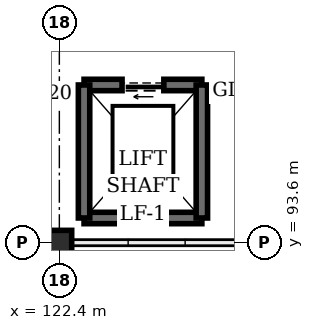
"""IFC4 building model, lengths in metres.
Left out: names, types, materials, properties, quantities, classifications, styles, units other than length and angle.
Written with IfcOpenShell. Run it as: python <this file> out.ifc"""

import sys

from ifc_helpers import new_model, si_unit, direction, frame, frame_2d, origin, origin_2d, place, context, subcontext, project, spatial, rectangle, extrude, element, fill, save


model = new_model("IFC4")
c1 = context("Model", 3, precision=1e-05, world=origin(), true_north=direction((0.0, 1.0)))
c2 = subcontext(c1, "Body", "Model", "MODEL_VIEW")
j1 = project(units=[si_unit("LENGTHUNIT", "METRE"), si_unit("PLANEANGLEUNIT", "RADIAN")], contexts=[c1])
p1 = place(None, origin())
s1 = spatial("IfcSite", under=j1, at=p1, CompositionType="ELEMENT")
p2 = place(p1, origin())
s2 = spatial("IfcBuilding", under=s1, at=p2, CompositionType="ELEMENT")
p3 = place(p2, frame((0.0, 0.0, 10.2)))
s3 = spatial("IfcBuildingStorey", under=s2, at=p3, CompositionType="ELEMENT", Elevation=10.2)
p4 = place(p3, frame((122.4, 93.6, 0.0), z_axis=(0.0, 0.0, 1.0), x_axis=(1.0, 0.0, 0.0)))
e1 = element("IfcColumn", 1, at=p4, inside=s3, PredefinedType="COLUMN", context=c2, shape_type="SweptSolid", body=[
    extrude(rectangle(XDim=0.65, YDim=0.65, at=origin_2d()), origin(), (0.0, 0.0, 1.0), 4.2),
])
p5 = place(p3, frame((123.05, 94.25, 0.0), z_axis=(0.0, 0.0, 1.0), x_axis=(1.0, 0.0, 0.0)))
e2 = element("IfcWall", 2, at=p5, inside=s3, PredefinedType="SHEAR", context=c2, shape_type="SweptSolid", body=[
    extrude(rectangle(XDim=3.1, YDim=0.3, at=frame_2d((1.55, 0.0))), origin(), (0.0, 0.0, 1.0), 3.95),
])
p6 = place(p3, frame((126.15, 97.75, 0.0), z_axis=(0.0, 0.0, 1.0), x_axis=(-1.0, 0.0, 0.0)))
e3 = element("IfcWall", 3, at=p6, inside=s3, PredefinedType="SHEAR", context=c2, shape_type="SweptSolid", body=[
    extrude(rectangle(XDim=3.1, YDim=0.3, at=frame_2d((1.55, 0.0))), origin(), (0.0, 0.0, 1.0), 3.95),
])
p7 = place(p6, frame((1.0, 0.0, 0.0)))
e4 = element("IfcOpeningElement", 4, at=p7, cuts=e3, PredefinedType="OPENING", context=c2, shape_type="SweptSolid", body=[
    extrude(rectangle(XDim=1.1, YDim=2.22, at=frame_2d((0.55, 1.11))), frame((0.0, 0.16, 0.0), z_axis=(0.0, -1.0, 0.0), x_axis=(1.0, 0.0, 0.0)), (0.0, 0.0, 1.0), 0.32),
])
for number, where, z_axis, x_axis in (
    (5, (123.05, 97.75, 0.0), (0.0, 0.0, 1.0), (0.0, -1.0, 0.0)),
    (6, (126.15, 94.25, 0.0), (0.0, 0.0, 1.0), (0.0, 1.0, 0.0)),
):
    element("IfcWall", number, at=place(p3, frame(where, z_axis=z_axis, x_axis=x_axis)), inside=s3, PredefinedType="SHEAR", context=c2, shape_type="SweptSolid", body=[
        extrude(rectangle(XDim=3.5, YDim=0.3, at=frame_2d((1.75, 0.0))), origin(), (0.0, 0.0, 1.0), 3.95),
    ])
p8 = place(p7, origin())
e7 = element("IfcDoor", 7, at=p8, inside=s3, OperationType="SLIDING_TO_LEFT", PredefinedType="DOOR", context=c2, shape_type="SweptSolid", body=[
    extrude(rectangle(XDim=1.1, YDim=2.22, at=frame_2d((0.55, 1.11))), frame((0.0, 0.025, 0.0), z_axis=(0.0, -1.0, 0.0), x_axis=(1.0, 0.0, 0.0)), (0.0, 0.0, 1.0), 0.05),
])
fill(e4, e7)
save(model, sys.argv[1])
